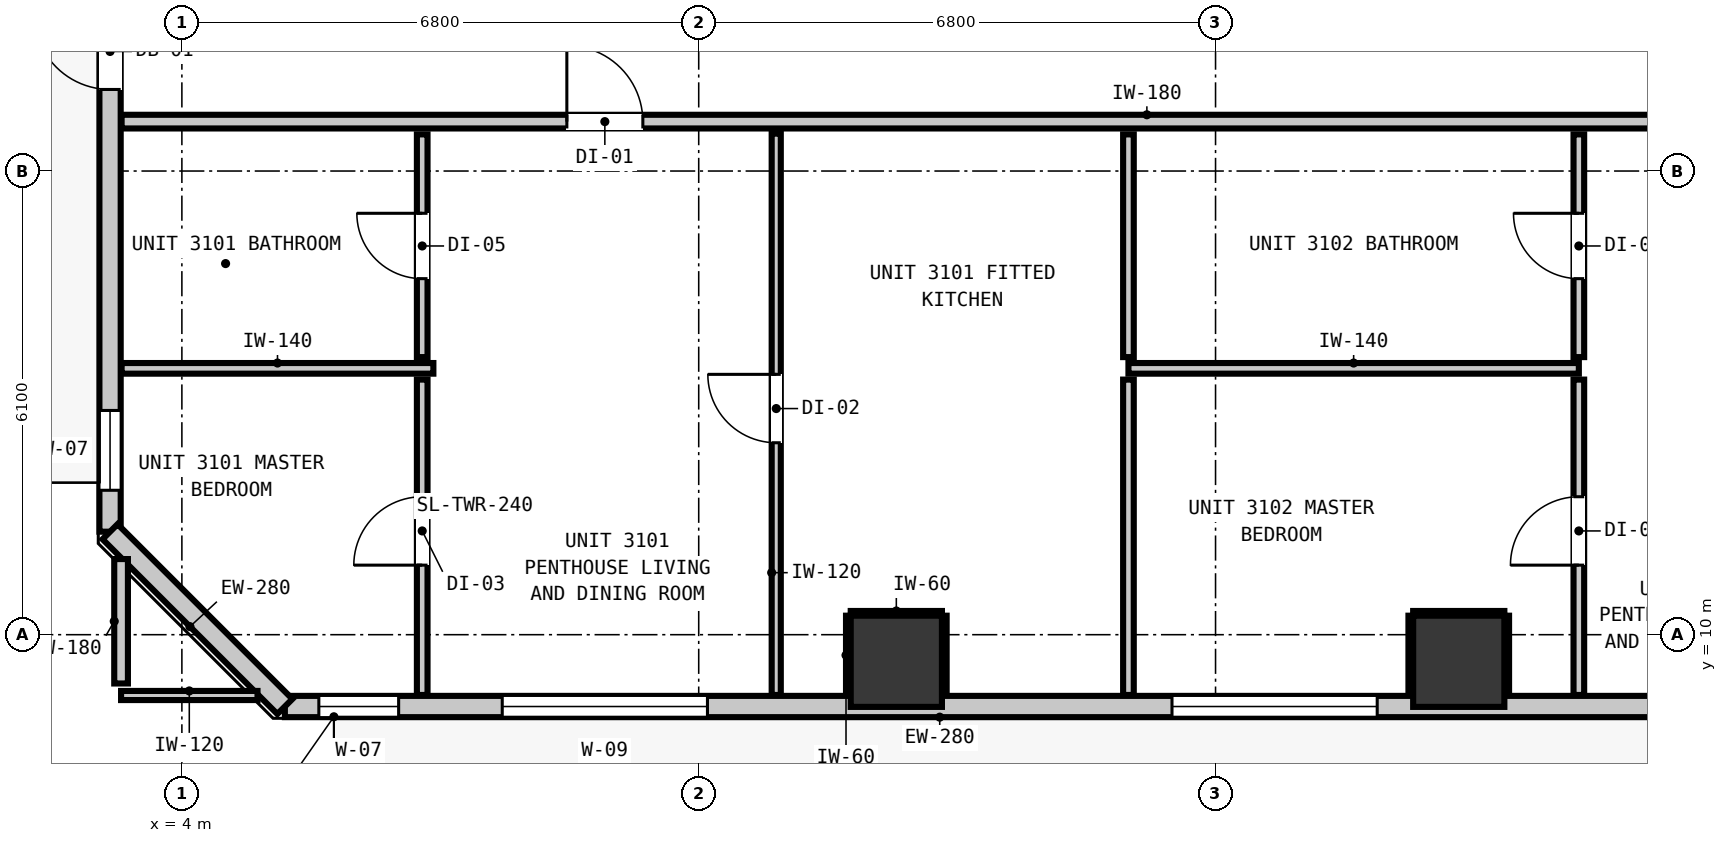
"""IFC4 building model, lengths in metres.
Left out: names, types, materials, properties, quantities, classifications, styles, units other than length and angle.
Written with IfcOpenShell. Run it as: python <this file> out.ifc"""

import sys

from ifc_helpers import new_model, si_unit, direction, frame, frame_2d, origin, origin_2d, place, context, subcontext, project, spatial, rectangle, extrude, element, fill, save


model = new_model("IFC4")
c1 = context("Model", 3, precision=1e-05, world=origin(), true_north=direction((0.0, 1.0)))
c2 = subcontext(c1, "Body", "Model", "MODEL_VIEW")
j1 = project(units=[si_unit("LENGTHUNIT", "METRE"), si_unit("PLANEANGLEUNIT", "RADIAN")], contexts=[c1])
p1 = place(None, origin())
s1 = spatial("IfcSite", under=j1, at=p1, CompositionType="ELEMENT")
p2 = place(p1, origin())
s2 = spatial("IfcBuilding", under=s1, at=p2, CompositionType="ELEMENT")
p3 = place(p2, frame((0.0, 0.0, 109.4)))
s3 = spatial("IfcBuildingStorey", under=s2, at=p3, CompositionType="ELEMENT", Elevation=109.4)
for number, where, z_axis, x_axis in (
    (1, (13.4, 9.65, 0.0), (0.0, 0.0, 1.0), (1.0, 0.0, 0.0)),
    (2, (20.8, 9.65, 0.0), (0.0, 0.0, 1.0), (1.0, 0.0, 0.0)),
):
    element("IfcColumn", number, at=place(p3, frame(where, z_axis=z_axis, x_axis=x_axis)), inside=s3, PredefinedType="COLUMN", context=c2, shape_type="SweptSolid", body=[
        extrude(rectangle(XDim=1.2, YDim=1.2, at=origin_2d()), origin(), (0.0, 0.0, 1.0), 3.32),
    ])
p4 = place(p3, frame((3.055, 11.355, 0.0), z_axis=(0.0, 0.0, 1.0), x_axis=(0.0, 1.0, 0.0)))
e3 = element("IfcWall", 3, at=p4, inside=s3, PredefinedType="STANDARD", context=c2, shape_type="SweptSolid", body=[
    extrude(rectangle(XDim=32.29, YDim=0.28, at=frame_2d((16.145, 0.0))), origin(), (0.0, 0.0, 1.0), 3.08),
])
p5 = place(p4, frame((5.818, 0.0, 0.0)))
e4 = element("IfcOpeningElement", 4, at=p5, cuts=e3, PredefinedType="OPENING", context=c2, shape_type="SweptSolid", body=[
    extrude(rectangle(XDim=1.0, YDim=2.15, at=frame_2d((0.5, 1.075))), frame((0.0, 0.15, 0.0), z_axis=(0.0, -1.0, 0.0), x_axis=(1.0, 0.0, 0.0)), (0.0, 0.0, 1.0), 0.3),
])
p6 = place(p4, frame((0.545, 0.0, 0.85)))
e5 = element("IfcOpeningElement", 5, at=p6, cuts=e3, PredefinedType="OPENING", context=c2, shape_type="SweptSolid", body=[
    extrude(rectangle(XDim=1.05, YDim=1.65, at=frame_2d((0.525, 0.825))), frame((0.0, 0.15, 0.0), z_axis=(0.0, -1.0, 0.0), x_axis=(1.0, 0.0, 0.0)), (0.0, 0.0, 1.0), 0.3),
])
p7 = place(p4, frame((13.124, 0.0, 0.85)))
e6 = element("IfcOpeningElement", 6, at=p7, cuts=e3, PredefinedType="OPENING", context=c2, shape_type="SweptSolid", body=[
    extrude(rectangle(XDim=2.7, YDim=2.0, at=frame_2d((1.35, 1.0))), frame((0.0, 0.15, 0.0), z_axis=(0.0, -1.0, 0.0), x_axis=(1.0, 0.0, 0.0)), (0.0, 0.0, 1.0), 0.3),
])
p8 = place(p4, frame((17.188, 0.0, 0.85)))
e7 = element("IfcOpeningElement", 7, at=p8, cuts=e3, PredefinedType="OPENING", context=c2, shape_type="SweptSolid", body=[
    extrude(rectangle(XDim=1.05, YDim=1.65, at=frame_2d((0.525, 0.825))), frame((0.0, 0.15, 0.0), z_axis=(0.0, -1.0, 0.0), x_axis=(1.0, 0.0, 0.0)), (0.0, 0.0, 1.0), 0.3),
])
p9 = place(p4, frame((22.674, 0.0, 0.85)))
e8 = element("IfcOpeningElement", 8, at=p9, cuts=e3, PredefinedType="OPENING", context=c2, shape_type="SweptSolid", body=[
    extrude(rectangle(XDim=2.7, YDim=2.0, at=frame_2d((1.35, 1.0))), frame((0.0, 0.15, 0.0), z_axis=(0.0, -1.0, 0.0), x_axis=(1.0, 0.0, 0.0)), (0.0, 0.0, 1.0), 0.3),
])
p10 = place(p4, frame((26.312, 0.0, 0.85)))
e9 = element("IfcOpeningElement", 9, at=p10, cuts=e3, PredefinedType="OPENING", context=c2, shape_type="SweptSolid", body=[
    extrude(rectangle(XDim=1.05, YDim=1.65, at=frame_2d((0.525, 0.825))), frame((0.0, 0.15, 0.0), z_axis=(0.0, -1.0, 0.0), x_axis=(1.0, 0.0, 0.0)), (0.0, 0.0, 1.0), 0.3),
])
p11 = place(p3, frame((40.445, 9.055, 0.0), z_axis=(0.0, 0.0, 1.0), x_axis=(-1.0, 0.0, 0.0)))
e10 = element("IfcWall", 10, at=p11, inside=s3, PredefinedType="STANDARD", context=c2, shape_type="SweptSolid", body=[
    extrude(rectangle(XDim=35.09, YDim=0.28, at=frame_2d((17.545, 0.0))), origin(), (0.0, 0.0, 1.0), 3.08),
])
p12 = place(p11, frame((5.114, 0.0, 0.0)))
e11 = element("IfcOpeningElement", 11, at=p12, cuts=e10, PredefinedType="OPENING", context=c2, shape_type="SweptSolid", body=[
    extrude(rectangle(XDim=1.0, YDim=2.15, at=frame_2d((0.5, 1.075))), frame((0.0, 0.15, 0.0), z_axis=(0.0, -1.0, 0.0), x_axis=(1.0, 0.0, 0.0)), (0.0, 0.0, 1.0), 0.3),
])
p13 = place(p11, frame((29.53, 0.0, 0.85)))
e12 = element("IfcOpeningElement", 12, at=p13, cuts=e10, PredefinedType="OPENING", context=c2, shape_type="SweptSolid", body=[
    extrude(rectangle(XDim=2.7, YDim=2.0, at=frame_2d((1.35, 1.0))), frame((0.0, 0.15, 0.0), z_axis=(0.0, -1.0, 0.0), x_axis=(1.0, 0.0, 0.0)), (0.0, 0.0, 1.0), 0.3),
])
p14 = place(p11, frame((33.593, 0.0, 0.85)))
e13 = element("IfcOpeningElement", 13, at=p14, cuts=e10, PredefinedType="OPENING", context=c2, shape_type="SweptSolid", body=[
    extrude(rectangle(XDim=1.05, YDim=1.65, at=frame_2d((0.525, 0.825))), frame((0.0, 0.15, 0.0), z_axis=(0.0, -1.0, 0.0), x_axis=(1.0, 0.0, 0.0)), (0.0, 0.0, 1.0), 0.3),
])
p15 = place(p11, frame((16.092, 0.0, 0.85)))
e14 = element("IfcOpeningElement", 14, at=p15, cuts=e10, PredefinedType="OPENING", context=c2, shape_type="SweptSolid", body=[
    extrude(rectangle(XDim=1.05, YDim=1.65, at=frame_2d((0.525, 0.825))), frame((0.0, 0.15, 0.0), z_axis=(0.0, -1.0, 0.0), x_axis=(1.0, 0.0, 0.0)), (0.0, 0.0, 1.0), 0.3),
])
p16 = place(p11, frame((20.718, 0.0, 0.85)))
e15 = element("IfcOpeningElement", 15, at=p16, cuts=e10, PredefinedType="OPENING", context=c2, shape_type="SweptSolid", body=[
    extrude(rectangle(XDim=2.7, YDim=2.0, at=frame_2d((1.35, 1.0))), frame((0.0, 0.15, 0.0), z_axis=(0.0, -1.0, 0.0), x_axis=(1.0, 0.0, 0.0)), (0.0, 0.0, 1.0), 0.3),
])
p17 = place(p11, frame((6.707, 0.0, 0.85)))
e16 = element("IfcOpeningElement", 16, at=p17, cuts=e10, PredefinedType="OPENING", context=c2, shape_type="SweptSolid", body=[
    extrude(rectangle(XDim=1.05, YDim=1.65, at=frame_2d((0.525, 0.825))), frame((0.0, 0.15, 0.0), z_axis=(0.0, -1.0, 0.0), x_axis=(1.0, 0.0, 0.0)), (0.0, 0.0, 1.0), 0.3),
])
p18 = place(p11, frame((8.973, 0.0, 0.85)))
e17 = element("IfcOpeningElement", 17, at=p18, cuts=e10, PredefinedType="OPENING", context=c2, shape_type="SweptSolid", body=[
    extrude(rectangle(XDim=1.05, YDim=1.65, at=frame_2d((0.525, 0.825))), frame((0.0, 0.15, 0.0), z_axis=(0.0, -1.0, 0.0), x_axis=(1.0, 0.0, 0.0)), (0.0, 0.0, 1.0), 0.3),
])
p19 = place(p3, frame((5.355, 9.055, 0.0), z_axis=(0.0, 0.0, 1.0), x_axis=(-0.707106781187, 0.707106781187, 0.0)))
e18 = element("IfcWall", 18, at=p19, inside=s3, PredefinedType="STANDARD", context=c2, shape_type="SweptSolid", body=[
    extrude(rectangle(XDim=3.253, YDim=0.28, at=frame_2d((1.626, 0.0))), origin(), (0.0, 0.0, 1.0), 3.08),
])
p20 = place(p3, frame((3.207, 16.75, 0.0), z_axis=(0.0, 0.0, 1.0), x_axis=(1.0, 0.0, 0.0)))
e19 = element("IfcWall", 19, at=p20, inside=s3, PredefinedType="PARTITIONING", context=c2, shape_type="SweptSolid", body=[
    extrude(rectangle(XDim=39.386, YDim=0.18, at=frame_2d((19.693, 0.0))), origin(), (0.0, 0.0, 1.0), 3.08),
])
p21 = place(p20, frame((5.858, 0.0, 0.0)))
e20 = element("IfcOpeningElement", 20, at=p21, cuts=e19, PredefinedType="OPENING", context=c2, shape_type="SweptSolid", body=[
    extrude(rectangle(XDim=1.0, YDim=2.15, at=frame_2d((0.5, 1.075))), frame((0.0, 0.1, 0.0), z_axis=(0.0, -1.0, 0.0), x_axis=(1.0, 0.0, 0.0)), (0.0, 0.0, 1.0), 0.2),
])
p22 = place(p20, frame((20.121, 0.0, 0.0)))
e21 = element("IfcOpeningElement", 21, at=p22, cuts=e19, PredefinedType="OPENING", context=c2, shape_type="SweptSolid", body=[
    extrude(rectangle(XDim=1.0, YDim=2.15, at=frame_2d((0.5, 1.075))), frame((0.0, 0.1, 0.0), z_axis=(0.0, -1.0, 0.0), x_axis=(1.0, 0.0, 0.0)), (0.0, 0.0, 1.0), 0.2),
])
p23 = place(p20, frame((31.654, 0.0, 0.0)))
e22 = element("IfcOpeningElement", 22, at=p23, cuts=e19, PredefinedType="OPENING", context=c2, shape_type="SweptSolid", body=[
    extrude(rectangle(XDim=1.0, YDim=2.15, at=frame_2d((0.5, 1.075))), frame((0.0, 0.1, 0.0), z_axis=(0.0, -1.0, 0.0), x_axis=(1.0, 0.0, 0.0)), (0.0, 0.0, 1.0), 0.2),
])
p24 = place(p3, frame((3.207, 13.504, 0.0), z_axis=(0.0, 0.0, 1.0), x_axis=(1.0, 0.0, 0.0)))
e23 = element("IfcWall", 23, at=p24, inside=s3, PredefinedType="PARTITIONING", context=c2, shape_type="SweptSolid", body=[
    extrude(rectangle(XDim=4.102, YDim=0.14, at=frame_2d((2.051, 0.0))), origin(), (0.0, 0.0, 1.0), 3.08),
])
p25 = place(p3, frame((16.454, 13.504, 0.0), z_axis=(0.0, 0.0, 1.0), x_axis=(1.0, 0.0, 0.0)))
e24 = element("IfcWall", 24, at=p25, inside=s3, PredefinedType="PARTITIONING", context=c2, shape_type="SweptSolid", body=[
    extrude(rectangle(XDim=5.926, YDim=0.14, at=frame_2d((2.963, 0.0))), origin(), (0.0, 0.0, 1.0), 3.08),
])
p26 = place(p3, frame((3.2, 9.2, 0.0), z_axis=(0.0, 0.0, 1.0), x_axis=(1.0, 0.0, 0.0)))
e25 = element("IfcWall", 25, at=p26, inside=s3, PredefinedType="PARTITIONING", context=c2, shape_type="SweptSolid", body=[
    extrude(rectangle(XDim=1.795, YDim=0.12, at=frame_2d((0.897, 0.0))), origin(), (0.0, 0.0, 1.0), 3.08),
])
p27 = place(p3, frame((3.2, 9.358, 0.0), z_axis=(0.0, 0.0, 1.0), x_axis=(0.0, 1.0, 0.0)))
e26 = element("IfcWall", 26, at=p27, inside=s3, PredefinedType="PARTITIONING", context=c2, shape_type="SweptSolid", body=[
    extrude(rectangle(XDim=1.637, YDim=0.18, at=frame_2d((0.819, 0.0))), origin(), (0.0, 0.0, 1.0), 3.08),
])
p28 = place(p3, frame((7.162, 9.207, 0.0), z_axis=(0.0, 0.0, 1.0), x_axis=(0.0, 1.0, 0.0)))
e27 = element("IfcWall", 27, at=p28, inside=s3, PredefinedType="PARTITIONING", context=c2, shape_type="SweptSolid", body=[
    extrude(rectangle(XDim=4.149, YDim=0.14, at=frame_2d((2.074, 0.0))), origin(), (0.0, 0.0, 1.0), 3.08),
])
p29 = place(p28, frame((1.708, 0.0, 0.0)))
e28 = element("IfcOpeningElement", 28, at=p29, cuts=e27, PredefinedType="OPENING", context=c2, shape_type="SweptSolid", body=[
    extrude(rectangle(XDim=0.9, YDim=2.1, at=frame_2d((0.45, 1.05))), frame((0.0, 0.08, 0.0), z_axis=(0.0, -1.0, 0.0), x_axis=(1.0, 0.0, 0.0)), (0.0, 0.0, 1.0), 0.16),
])
p30 = place(p3, frame((7.162, 13.652, 0.0), z_axis=(0.0, 0.0, 1.0), x_axis=(0.0, 1.0, 0.0)))
e29 = element("IfcWall", 29, at=p30, inside=s3, PredefinedType="PARTITIONING", context=c2, shape_type="SweptSolid", body=[
    extrude(rectangle(XDim=2.93, YDim=0.14, at=frame_2d((1.465, 0.0))), origin(), (0.0, 0.0, 1.0), 3.08),
])
p31 = place(p30, frame((1.032, 0.0, 0.0)))
e30 = element("IfcOpeningElement", 30, at=p31, cuts=e29, PredefinedType="OPENING", context=c2, shape_type="SweptSolid", body=[
    extrude(rectangle(XDim=0.86, YDim=2.02, at=frame_2d((0.43, 1.01))), frame((0.0, 0.08, 0.0), z_axis=(0.0, -1.0, 0.0), x_axis=(1.0, 0.0, 0.0)), (0.0, 0.0, 1.0), 0.16),
])
p32 = place(p3, frame((16.454, 9.207, 0.0), z_axis=(0.0, 0.0, 1.0), x_axis=(0.0, 1.0, 0.0)))
e31 = element("IfcWall", 31, at=p32, inside=s3, PredefinedType="PARTITIONING", context=c2, shape_type="SweptSolid", body=[
    extrude(rectangle(XDim=4.149, YDim=0.14, at=frame_2d((2.074, 0.0))), origin(), (0.0, 0.0, 1.0), 3.08),
])
p33 = place(p3, frame((16.454, 13.652, 0.0), z_axis=(0.0, 0.0, 1.0), x_axis=(0.0, 1.0, 0.0)))
e32 = element("IfcWall", 32, at=p33, inside=s3, PredefinedType="PARTITIONING", context=c2, shape_type="SweptSolid", body=[
    extrude(rectangle(XDim=2.93, YDim=0.14, at=frame_2d((1.465, 0.0))), origin(), (0.0, 0.0, 1.0), 3.08),
])
p34 = place(p3, frame((22.38, 9.207, 0.0), z_axis=(0.0, 0.0, 1.0), x_axis=(0.0, 1.0, 0.0)))
e33 = element("IfcWall", 33, at=p34, inside=s3, PredefinedType="PARTITIONING", context=c2, shape_type="SweptSolid", body=[
    extrude(rectangle(XDim=4.149, YDim=0.14, at=frame_2d((2.074, 0.0))), origin(), (0.0, 0.0, 1.0), 3.08),
])
p35 = place(p34, frame((1.708, 0.0, 0.0)))
e34 = element("IfcOpeningElement", 34, at=p35, cuts=e33, PredefinedType="OPENING", context=c2, shape_type="SweptSolid", body=[
    extrude(rectangle(XDim=0.9, YDim=2.1, at=frame_2d((0.45, 1.05))), frame((0.0, 0.08, 0.0), z_axis=(0.0, -1.0, 0.0), x_axis=(1.0, 0.0, 0.0)), (0.0, 0.0, 1.0), 0.16),
])
p36 = place(p3, frame((22.38, 13.652, 0.0), z_axis=(0.0, 0.0, 1.0), x_axis=(0.0, 1.0, 0.0)))
e35 = element("IfcWall", 35, at=p36, inside=s3, PredefinedType="PARTITIONING", context=c2, shape_type="SweptSolid", body=[
    extrude(rectangle(XDim=2.93, YDim=0.14, at=frame_2d((1.465, 0.0))), origin(), (0.0, 0.0, 1.0), 3.08),
])
p37 = place(p36, frame((1.032, 0.0, 0.0)))
e36 = element("IfcOpeningElement", 36, at=p37, cuts=e35, PredefinedType="OPENING", context=c2, shape_type="SweptSolid", body=[
    extrude(rectangle(XDim=0.86, YDim=2.02, at=frame_2d((0.43, 1.01))), frame((0.0, 0.08, 0.0), z_axis=(0.0, -1.0, 0.0), x_axis=(1.0, 0.0, 0.0)), (0.0, 0.0, 1.0), 0.16),
])
p38 = place(p3, frame((11.82, 9.207, 0.0), z_axis=(0.0, 0.0, 1.0), x_axis=(0.0, 1.0, 0.0)))
e37 = element("IfcWall", 37, at=p38, inside=s3, PredefinedType="PARTITIONING", context=c2, shape_type="SweptSolid", body=[
    extrude(rectangle(XDim=7.385, YDim=0.12, at=frame_2d((3.692, 0.0))), origin(), (0.0, 0.0, 1.0), 3.08),
])
p39 = place(p38, frame((3.318, 0.0, 0.0)))
e38 = element("IfcOpeningElement", 38, at=p39, cuts=e37, PredefinedType="OPENING", context=c2, shape_type="SweptSolid", body=[
    extrude(rectangle(XDim=0.9, YDim=2.1, at=frame_2d((0.45, 1.05))), frame((0.0, 0.07, 0.0), z_axis=(0.0, -1.0, 0.0), x_axis=(1.0, 0.0, 0.0)), (0.0, 0.0, 1.0), 0.14),
])
p40 = place(p3, frame((12.8, 10.282, 0.0), z_axis=(0.0, 0.0, 1.0), x_axis=(1.0, 0.0, 0.0)))
e39 = element("IfcWall", 39, at=p40, inside=s3, PredefinedType="PARTITIONING", context=c2, shape_type="SweptSolid", body=[
    extrude(rectangle(XDim=1.2, YDim=0.06, at=frame_2d((0.6, 0.0))), origin(), (0.0, 0.0, 1.0), 1.45),
])
for number, where, z_axis, x_axis in (
    (40, (12.768, 9.21, 0.0), (0.0, 0.0, 1.0), (0.0, 1.0, 0.0)),
    (41, (14.032, 9.21, 0.0), (0.0, 0.0, 1.0), (0.0, 1.0, 0.0)),
):
    element("IfcWall", number, at=place(p3, frame(where, z_axis=z_axis, x_axis=x_axis)), inside=s3, PredefinedType="PARTITIONING", context=c2, shape_type="SweptSolid", body=[
        extrude(rectangle(XDim=1.04, YDim=0.06, at=frame_2d((0.52, 0.0))), origin(), (0.0, 0.0, 1.0), 1.45),
    ])
p41 = place(p3, frame((20.2, 10.282, 0.0), z_axis=(0.0, 0.0, 1.0), x_axis=(1.0, 0.0, 0.0)))
e42 = element("IfcWall", 42, at=p41, inside=s3, PredefinedType="PARTITIONING", context=c2, shape_type="SweptSolid", body=[
    extrude(rectangle(XDim=1.2, YDim=0.06, at=frame_2d((0.6, 0.0))), origin(), (0.0, 0.0, 1.0), 1.45),
])
for number, where, z_axis, x_axis in (
    (43, (20.168, 9.21, 0.0), (0.0, 0.0, 1.0), (0.0, 1.0, 0.0)),
    (44, (21.432, 9.21, 0.0), (0.0, 0.0, 1.0), (0.0, 1.0, 0.0)),
):
    element("IfcWall", number, at=place(p3, frame(where, z_axis=z_axis, x_axis=x_axis)), inside=s3, PredefinedType="PARTITIONING", context=c2, shape_type="SweptSolid", body=[
        extrude(rectangle(XDim=1.04, YDim=0.06, at=frame_2d((0.52, 0.0))), origin(), (0.0, 0.0, 1.0), 1.45),
    ])
p42 = place(p5, origin())
e45 = element("IfcDoor", 45, at=p42, inside=s3, OperationType="SINGLE_SWING_RIGHT", PredefinedType="DOOR", context=c2, shape_type="SweptSolid", body=[
    extrude(rectangle(XDim=1.0, YDim=2.15, at=frame_2d((0.5, 1.075))), frame((0.0, 0.025, 0.0), z_axis=(0.0, -1.0, 0.0), x_axis=(1.0, 0.0, 0.0)), (0.0, 0.0, 1.0), 0.05),
])
fill(e4, e45)
p43 = place(p6, origin())
e46 = element("IfcWindow", 46, at=p43, inside=s3, PartitioningType="SINGLE_PANEL", PredefinedType="WINDOW", context=c2, shape_type="SweptSolid", body=[
    extrude(rectangle(XDim=1.05, YDim=1.65, at=frame_2d((0.525, 0.825))), frame((0.0, 0.03, 0.0), z_axis=(0.0, -1.0, 0.0), x_axis=(1.0, 0.0, 0.0)), (0.0, 0.0, 1.0), 0.06),
])
fill(e5, e46)
p44 = place(p13, origin())
e47 = element("IfcWindow", 47, at=p44, inside=s3, PartitioningType="SINGLE_PANEL", PredefinedType="WINDOW", context=c2, shape_type="SweptSolid", body=[
    extrude(rectangle(XDim=2.7, YDim=2.0, at=frame_2d((1.35, 1.0))), frame((0.0, 0.03, 0.0), z_axis=(0.0, -1.0, 0.0), x_axis=(1.0, 0.0, 0.0)), (0.0, 0.0, 1.0), 0.06),
])
fill(e12, e47)
p45 = place(p14, origin())
e48 = element("IfcWindow", 48, at=p45, inside=s3, PartitioningType="SINGLE_PANEL", PredefinedType="WINDOW", context=c2, shape_type="SweptSolid", body=[
    extrude(rectangle(XDim=1.05, YDim=1.65, at=frame_2d((0.525, 0.825))), frame((0.0, 0.03, 0.0), z_axis=(0.0, -1.0, 0.0), x_axis=(1.0, 0.0, 0.0)), (0.0, 0.0, 1.0), 0.06),
])
fill(e13, e48)
p46 = place(p16, origin())
e49 = element("IfcWindow", 49, at=p46, inside=s3, PartitioningType="SINGLE_PANEL", PredefinedType="WINDOW", context=c2, shape_type="SweptSolid", body=[
    extrude(rectangle(XDim=2.7, YDim=2.0, at=frame_2d((1.35, 1.0))), frame((0.0, 0.03, 0.0), z_axis=(0.0, -1.0, 0.0), x_axis=(1.0, 0.0, 0.0)), (0.0, 0.0, 1.0), 0.06),
])
fill(e15, e49)
p47 = place(p21, origin())
e50 = element("IfcDoor", 50, at=p47, inside=s3, OperationType="SINGLE_SWING_LEFT", PredefinedType="DOOR", context=c2, shape_type="SweptSolid", body=[
    extrude(rectangle(XDim=1.0, YDim=2.15, at=frame_2d((0.5, 1.075))), frame((0.0, 0.025, 0.0), z_axis=(0.0, -1.0, 0.0), x_axis=(1.0, 0.0, 0.0)), (0.0, 0.0, 1.0), 0.05),
])
fill(e20, e50)
p48 = place(p31, origin())
e51 = element("IfcDoor", 51, at=p48, inside=s3, OperationType="SINGLE_SWING_RIGHT", PredefinedType="DOOR", context=c2, shape_type="SweptSolid", body=[
    extrude(rectangle(XDim=0.86, YDim=2.02, at=frame_2d((0.43, 1.01))), frame((0.0, 0.025, 0.0), z_axis=(0.0, -1.0, 0.0), x_axis=(1.0, 0.0, 0.0)), (0.0, 0.0, 1.0), 0.05),
])
fill(e30, e51)
p49 = place(p29, origin())
e52 = element("IfcDoor", 52, at=p49, inside=s3, OperationType="SINGLE_SWING_LEFT", PredefinedType="DOOR", context=c2, shape_type="SweptSolid", body=[
    extrude(rectangle(XDim=0.9, YDim=2.1, at=frame_2d((0.45, 1.05))), frame((0.0, 0.025, 0.0), z_axis=(0.0, -1.0, 0.0), x_axis=(1.0, 0.0, 0.0)), (0.0, 0.0, 1.0), 0.05),
])
fill(e28, e52)
p50 = place(p39, origin())
e53 = element("IfcDoor", 53, at=p50, inside=s3, OperationType="SINGLE_SWING_RIGHT", PredefinedType="DOOR", context=c2, shape_type="SweptSolid", body=[
    extrude(rectangle(XDim=0.9, YDim=2.1, at=frame_2d((0.45, 1.05))), frame((0.0, 0.025, 0.0), z_axis=(0.0, -1.0, 0.0), x_axis=(1.0, 0.0, 0.0)), (0.0, 0.0, 1.0), 0.05),
])
fill(e38, e53)
p51 = place(p37, origin())
e54 = element("IfcDoor", 54, at=p51, inside=s3, OperationType="SINGLE_SWING_RIGHT", PredefinedType="DOOR", context=c2, shape_type="SweptSolid", body=[
    extrude(rectangle(XDim=0.86, YDim=2.02, at=frame_2d((0.43, 1.01))), frame((0.0, 0.025, 0.0), z_axis=(0.0, -1.0, 0.0), x_axis=(1.0, 0.0, 0.0)), (0.0, 0.0, 1.0), 0.05),
])
fill(e36, e54)
p52 = place(p35, origin())
e55 = element("IfcDoor", 55, at=p52, inside=s3, OperationType="SINGLE_SWING_LEFT", PredefinedType="DOOR", context=c2, shape_type="SweptSolid", body=[
    extrude(rectangle(XDim=0.9, YDim=2.1, at=frame_2d((0.45, 1.05))), frame((0.0, 0.025, 0.0), z_axis=(0.0, -1.0, 0.0), x_axis=(1.0, 0.0, 0.0)), (0.0, 0.0, 1.0), 0.05),
])
fill(e34, e55)
save(model, sys.argv[1])
